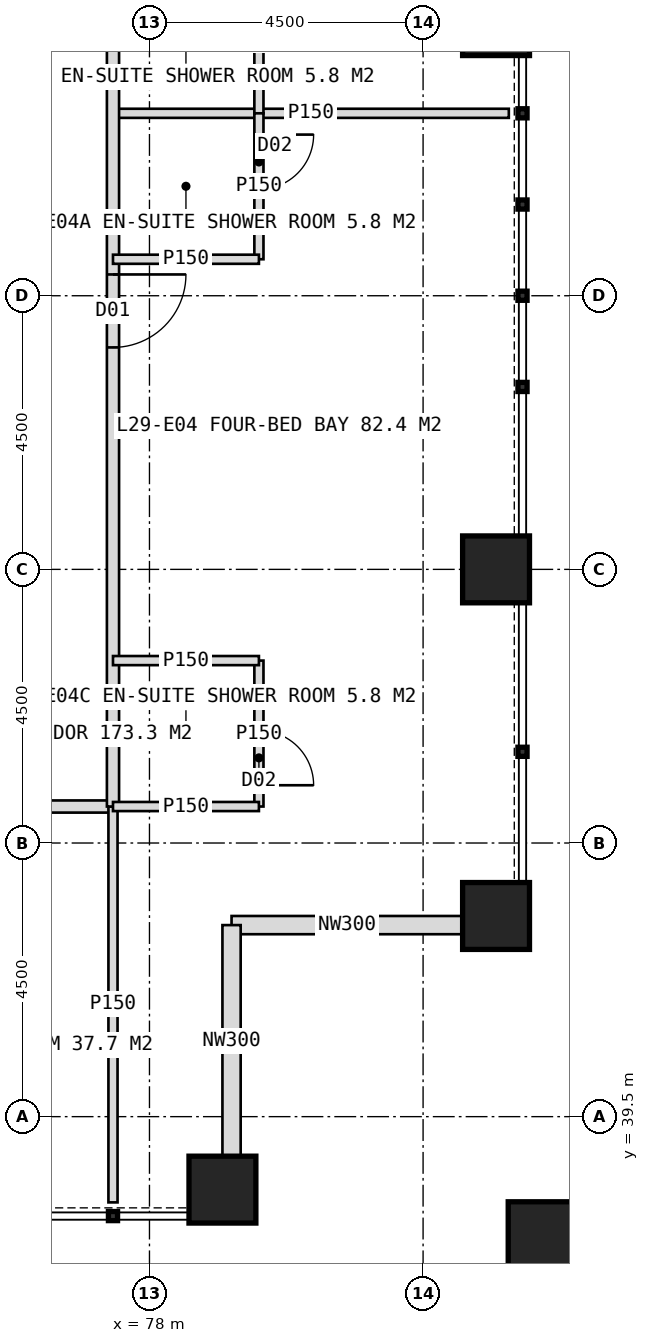
"""IFC4 building model, lengths in metres.
Left out: names, types, materials, properties, quantities, classifications, styles, units other than length and angle.
Written with IfcOpenShell. Run it as: python <this file> out.ifc"""

import sys

from ifc_helpers import new_model, si_unit, direction, frame, frame_2d, origin, origin_2d, place, context, subcontext, project, spatial, rectangle, hollow_rectangle, extrude, element, fill, save


model = new_model("IFC4")
c1 = context("Model", 3, precision=1e-05, world=origin(), true_north=direction((0.0, 1.0)))
c2 = subcontext(c1, "Body", "Model", "MODEL_VIEW")
j1 = project(units=[si_unit("LENGTHUNIT", "METRE"), si_unit("PLANEANGLEUNIT", "RADIAN")], contexts=[c1])
p1 = place(None, origin())
s1 = spatial("IfcSite", under=j1, at=p1, CompositionType="ELEMENT")
p2 = place(p1, origin())
s2 = spatial("IfcBuilding", under=s1, at=p2, CompositionType="ELEMENT")
p3 = place(p2, frame((0.0, 0.0, 124.0)))
s3 = spatial("IfcBuildingStorey", under=s2, at=p3, CompositionType="ELEMENT", Elevation=124.0)
for number, where, z_axis, x_axis in (
    (1, (83.7, 42.8, 0.0), (0.0, 0.0, 1.0), (1.0, 0.0, 0.0)),
    (2, (83.7, 48.5, 0.0), (0.0, 0.0, 1.0), (1.0, 0.0, 0.0)),
    (3, (83.7, 57.5, 0.0), (0.0, 0.0, 1.0), (1.0, 0.0, 0.0)),
    (4, (79.2, 38.3, 0.0), (0.0, 0.0, 1.0), (1.0, 0.0, 0.0)),
):
    element("IfcColumn", number, at=place(p3, frame(where, z_axis=z_axis, x_axis=x_axis)), inside=s3, PredefinedType="COLUMN", context=c2, shape_type="SweptSolid", body=[
        extrude(hollow_rectangle(XDim=1.1, YDim=1.1, WallThickness=0.1, at=origin_2d()), origin(), (0.0, 0.0, 1.0), 4.0),
    ])
p4 = place(p3, frame((84.6, 37.4, 0.0), z_axis=(0.0, 0.0, 1.0), x_axis=(1.0, 0.0, 0.0)))
e5 = element("IfcColumn", 5, at=p4, inside=s3, PredefinedType="COLUMN", context=c2, shape_type="SweptSolid", body=[
    extrude(hollow_rectangle(XDim=1.4, YDim=1.4, WallThickness=0.08, at=origin_2d()), origin(), (0.0, 0.0, 1.0), 4.0),
])
for number, where, z_axis, x_axis in (
    (6, (83.15, 42.65, 0.0), (0.0, 0.0, 1.0), (-1.0, 0.0, 0.0)),
    (7, (79.35, 42.65, 0.0), (0.0, 0.0, 1.0), (0.0, -1.0, 0.0)),
):
    element("IfcWall", number, at=place(p3, frame(where, z_axis=z_axis, x_axis=x_axis)), inside=s3, PredefinedType="ELEMENTEDWALL", context=c2, shape_type="SweptSolid", body=[
        extrude(rectangle(XDim=3.8, YDim=0.3, at=frame_2d((1.9, 0.0))), origin(), (0.0, 0.0, 1.0), 4.0),
    ])
p5 = place(p3, frame((77.4, 44.6, 0.0), z_axis=(0.0, 0.0, 1.0), x_axis=(-1.0, 0.0, 0.0)))
e8 = element("IfcWall", 8, at=p5, inside=s3, PredefinedType="PARTITIONING", context=c2, shape_type="SweptSolid", body=[
    extrude(rectangle(XDim=34.8, YDim=0.2, at=frame_2d((17.4, 0.0))), origin(), (0.0, 0.0, 1.0), 3.75),
])
p6 = place(p5, frame((2.45, 0.0, 0.0)))
e9 = element("IfcOpeningElement", 9, at=p6, cuts=e8, PredefinedType="OPENING", context=c2, shape_type="SweptSolid", body=[
    extrude(rectangle(XDim=1.2, YDim=2.2, at=frame_2d((0.6, 1.1))), frame((0.0, 0.11, 0.0), z_axis=(0.0, -1.0, 0.0), x_axis=(1.0, 0.0, 0.0)), (0.0, 0.0, 1.0), 0.22),
])
p7 = place(p5, frame((10.15, 0.0, 0.0)))
e10 = element("IfcOpeningElement", 10, at=p7, cuts=e8, PredefinedType="OPENING", context=c2, shape_type="SweptSolid", body=[
    extrude(rectangle(XDim=1.2, YDim=2.2, at=frame_2d((0.6, 1.1))), frame((0.0, 0.11, 0.0), z_axis=(0.0, -1.0, 0.0), x_axis=(1.0, 0.0, 0.0)), (0.0, 0.0, 1.0), 0.22),
])
p8 = place(p5, frame((20.45, 0.0, 0.0)))
e11 = element("IfcOpeningElement", 11, at=p8, cuts=e8, PredefinedType="OPENING", context=c2, shape_type="SweptSolid", body=[
    extrude(rectangle(XDim=1.2, YDim=2.2, at=frame_2d((0.6, 1.1))), frame((0.0, 0.11, 0.0), z_axis=(0.0, -1.0, 0.0), x_axis=(1.0, 0.0, 0.0)), (0.0, 0.0, 1.0), 0.22),
])
p9 = place(p5, frame((27.55, 0.0, 0.0)))
e12 = element("IfcOpeningElement", 12, at=p9, cuts=e8, PredefinedType="OPENING", context=c2, shape_type="SweptSolid", body=[
    extrude(rectangle(XDim=1.2, YDim=2.2, at=frame_2d((0.6, 1.1))), frame((0.0, 0.11, 0.0), z_axis=(0.0, -1.0, 0.0), x_axis=(1.0, 0.0, 0.0)), (0.0, 0.0, 1.0), 0.22),
])
for number, where, z_axis, x_axis in (
    (13, (77.4, 44.6, 0.0), (0.0, 0.0, 1.0), (0.0, -1.0, 0.0)),
    (14, (77.4, 56.0, 0.0), (0.0, 0.0, 1.0), (1.0, 0.0, 0.0)),
):
    element("IfcWall", number, at=place(p3, frame(where, z_axis=z_axis, x_axis=x_axis)), inside=s3, PredefinedType="PARTITIONING", context=c2, shape_type="SweptSolid", body=[
        extrude(rectangle(XDim=6.51, YDim=0.15, at=frame_2d((3.255, 0.0))), origin(), (0.0, 0.0, 1.0), 3.75),
    ])
p10 = place(p3, frame((77.4, 79.4, 0.0), z_axis=(0.0, 0.0, 1.0), x_axis=(0.0, -1.0, 0.0)))
e15 = element("IfcWall", 15, at=p10, inside=s3, PredefinedType="PARTITIONING", context=c2, shape_type="SweptSolid", body=[
    extrude(rectangle(XDim=34.8, YDim=0.2, at=frame_2d((17.4, 0.0))), origin(), (0.0, 0.0, 1.0), 3.75),
])
p11 = place(p10, frame((2.45, 0.0, 0.0)))
e16 = element("IfcOpeningElement", 16, at=p11, cuts=e15, PredefinedType="OPENING", context=c2, shape_type="SweptSolid", body=[
    extrude(rectangle(XDim=1.2, YDim=2.2, at=frame_2d((0.6, 1.1))), frame((0.0, 0.11, 0.0), z_axis=(0.0, -1.0, 0.0), x_axis=(1.0, 0.0, 0.0)), (0.0, 0.0, 1.0), 0.22),
])
p12 = place(p10, frame((10.15, 0.0, 0.0)))
e17 = element("IfcOpeningElement", 17, at=p12, cuts=e15, PredefinedType="OPENING", context=c2, shape_type="SweptSolid", body=[
    extrude(rectangle(XDim=1.2, YDim=2.2, at=frame_2d((0.6, 1.1))), frame((0.0, 0.11, 0.0), z_axis=(0.0, -1.0, 0.0), x_axis=(1.0, 0.0, 0.0)), (0.0, 0.0, 1.0), 0.22),
])
p13 = place(p10, frame((19.55, 0.0, 0.0)))
e18 = element("IfcOpeningElement", 18, at=p13, cuts=e15, PredefinedType="OPENING", context=c2, shape_type="SweptSolid", body=[
    extrude(rectangle(XDim=1.2, YDim=2.2, at=frame_2d((0.6, 1.1))), frame((0.0, 0.11, 0.0), z_axis=(0.0, -1.0, 0.0), x_axis=(1.0, 0.0, 0.0)), (0.0, 0.0, 1.0), 0.22),
])
p14 = place(p10, frame((26.05, 0.0, 0.0)))
e19 = element("IfcOpeningElement", 19, at=p14, cuts=e15, PredefinedType="OPENING", context=c2, shape_type="SweptSolid", body=[
    extrude(rectangle(XDim=1.2, YDim=2.2, at=frame_2d((0.6, 1.1))), frame((0.0, 0.11, 0.0), z_axis=(0.0, -1.0, 0.0), x_axis=(1.0, 0.0, 0.0)), (0.0, 0.0, 1.0), 0.22),
])
p15 = place(p3, frame((79.8, 58.4, 0.0), z_axis=(0.0, 0.0, 1.0), x_axis=(0.0, -1.0, 0.0)))
e20 = element("IfcWall", 20, at=p15, inside=s3, PredefinedType="PARTITIONING", context=c2, shape_type="SweptSolid", body=[
    extrude(rectangle(XDim=2.4, YDim=0.15, at=frame_2d((1.2, 0.0))), origin(), (0.0, 0.0, 1.0), 3.75),
])
p16 = place(p15, frame((0.35, 0.0, 0.0)))
e21 = element("IfcOpeningElement", 21, at=p16, cuts=e20, PredefinedType="OPENING", context=c2, shape_type="SweptSolid", body=[
    extrude(rectangle(XDim=0.9, YDim=2.1, at=frame_2d((0.45, 1.05))), frame((0.0, 0.085, 0.0), z_axis=(0.0, -1.0, 0.0), x_axis=(1.0, 0.0, 0.0)), (0.0, 0.0, 1.0), 0.17),
])
p17 = place(p3, frame((79.8, 56.0, 0.0), z_axis=(0.0, 0.0, 1.0), x_axis=(0.0, -1.0, 0.0)))
e22 = element("IfcWall", 22, at=p17, inside=s3, PredefinedType="PARTITIONING", context=c2, shape_type="SweptSolid", body=[
    extrude(rectangle(XDim=2.4, YDim=0.15, at=frame_2d((1.2, 0.0))), origin(), (0.0, 0.0, 1.0), 3.75),
])
p18 = place(p17, frame((0.35, 0.0, 0.0)))
e23 = element("IfcOpeningElement", 23, at=p18, cuts=e22, PredefinedType="OPENING", context=c2, shape_type="SweptSolid", body=[
    extrude(rectangle(XDim=0.9, YDim=2.1, at=frame_2d((0.45, 1.05))), frame((0.0, 0.085, 0.0), z_axis=(0.0, -1.0, 0.0), x_axis=(1.0, 0.0, 0.0)), (0.0, 0.0, 1.0), 0.17),
])
p19 = place(p3, frame((77.4, 53.6, 0.0), z_axis=(0.0, 0.0, 1.0), x_axis=(1.0, 0.0, 0.0)))
e24 = element("IfcWall", 24, at=p19, inside=s3, PredefinedType="PARTITIONING", context=c2, shape_type="SweptSolid", body=[
    extrude(rectangle(XDim=2.4, YDim=0.15, at=frame_2d((1.2, 0.0))), origin(), (0.0, 0.0, 1.0), 3.75),
])
p20 = place(p3, frame((79.8, 47.0, 0.0), z_axis=(0.0, 0.0, 1.0), x_axis=(0.0, -1.0, 0.0)))
e25 = element("IfcWall", 25, at=p20, inside=s3, PredefinedType="PARTITIONING", context=c2, shape_type="SweptSolid", body=[
    extrude(rectangle(XDim=2.4, YDim=0.15, at=frame_2d((1.2, 0.0))), origin(), (0.0, 0.0, 1.0), 3.75),
])
p21 = place(p20, frame((1.15, 0.0, 0.0)))
e26 = element("IfcOpeningElement", 26, at=p21, cuts=e25, PredefinedType="OPENING", context=c2, shape_type="SweptSolid", body=[
    extrude(rectangle(XDim=0.9, YDim=2.1, at=frame_2d((0.45, 1.05))), frame((0.0, 0.085, 0.0), z_axis=(0.0, -1.0, 0.0), x_axis=(1.0, 0.0, 0.0)), (0.0, 0.0, 1.0), 0.17),
])
for number, where, z_axis, x_axis in (
    (27, (77.4, 47.0, 0.0), (0.0, 0.0, 1.0), (1.0, 0.0, 0.0)),
    (28, (77.4, 44.6, 0.0), (0.0, 0.0, 1.0), (1.0, 0.0, 0.0)),
):
    element("IfcWall", number, at=place(p3, frame(where, z_axis=z_axis, x_axis=x_axis)), inside=s3, PredefinedType="PARTITIONING", context=c2, shape_type="SweptSolid", body=[
        extrude(rectangle(XDim=2.4, YDim=0.15, at=frame_2d((1.2, 0.0))), origin(), (0.0, 0.0, 1.0), 3.75),
    ])
p22 = place(p14, origin())
e29 = element("IfcDoor", 29, at=p22, inside=s3, OperationType="SINGLE_SWING_LEFT", PredefinedType="DOOR", context=c2, shape_type="SweptSolid", body=[
    extrude(rectangle(XDim=1.2, YDim=2.2, at=frame_2d((0.6, 1.1))), frame((0.0, 0.025, 0.0), z_axis=(0.0, -1.0, 0.0), x_axis=(1.0, 0.0, 0.0)), (0.0, 0.0, 1.0), 0.05),
])
fill(e19, e29)
p23 = place(p18, origin())
e30 = element("IfcDoor", 30, at=p23, inside=s3, OperationType="SINGLE_SWING_LEFT", PredefinedType="DOOR", context=c2, shape_type="SweptSolid", body=[
    extrude(rectangle(XDim=0.9, YDim=2.1, at=frame_2d((0.45, 1.05))), frame((0.0, 0.025, 0.0), z_axis=(0.0, -1.0, 0.0), x_axis=(1.0, 0.0, 0.0)), (0.0, 0.0, 1.0), 0.05),
])
fill(e23, e30)
p24 = place(p21, origin())
e31 = element("IfcDoor", 31, at=p24, inside=s3, OperationType="SINGLE_SWING_RIGHT", PredefinedType="DOOR", context=c2, shape_type="SweptSolid", body=[
    extrude(rectangle(XDim=0.9, YDim=2.1, at=frame_2d((0.45, 1.05))), frame((0.0, 0.025, 0.0), z_axis=(0.0, -1.0, 0.0), x_axis=(1.0, 0.0, 0.0)), (0.0, 0.0, 1.0), 0.05),
])
fill(e26, e31)
save(model, sys.argv[1])
